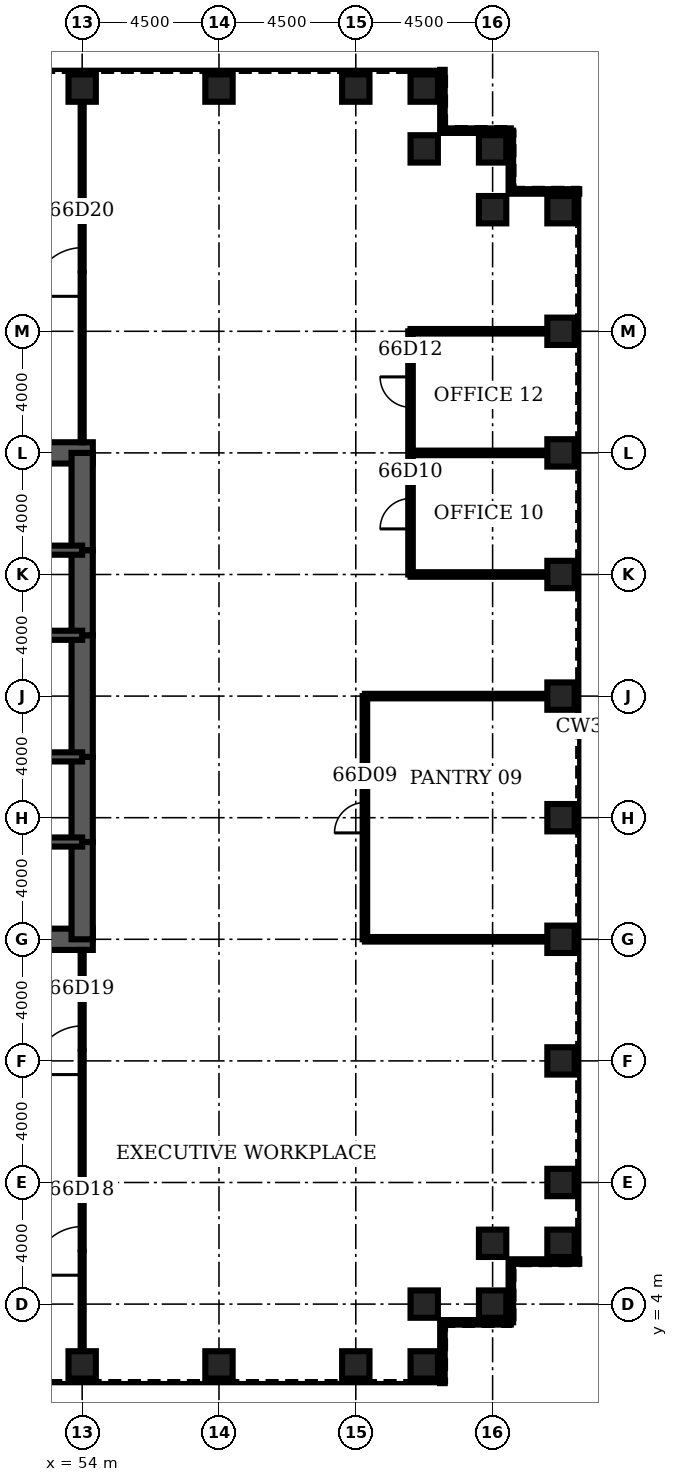
"""IFC4 building model, lengths in metres.
Left out: names, types, materials, properties, quantities, classifications, styles, units other than length and angle.
Written with IfcOpenShell. Run it as: python <this file> out.ifc"""

import sys

from ifc_helpers import new_model, si_unit, direction, frame, frame_2d, origin, origin_2d, place, context, subcontext, project, spatial, rectangle, hollow_rectangle, extrude, element, fill, save


model = new_model("IFC4")
c1 = context("Model", 3, precision=1e-05, world=origin(), true_north=direction((0.0, 1.0)))
c2 = subcontext(c1, "Body", "Model", "MODEL_VIEW")
j1 = project(units=[si_unit("LENGTHUNIT", "METRE"), si_unit("PLANEANGLEUNIT", "RADIAN")], contexts=[c1])
p1 = place(None, origin())
s1 = spatial("IfcSite", under=j1, at=p1, CompositionType="ELEMENT")
p2 = place(p1, origin())
s2 = spatial("IfcBuilding", under=s1, at=p2, CompositionType="ELEMENT")
p3 = place(p2, frame((0.0, 0.0, 292.1)))
s3 = spatial("IfcBuildingStorey", under=s2, at=p3, CompositionType="ELEMENT", Elevation=292.1)
for number, where, z_axis, x_axis in (
    (1, (54.0, 2.0, 0.0), (0.0, 0.0, 1.0), (0.0, 1.0, 0.0)),
    (2, (58.5, 2.0, 0.0), (0.0, 0.0, 1.0), (0.0, 1.0, 0.0)),
    (3, (63.0, 2.0, 0.0), (0.0, 0.0, 1.0), (0.0, 1.0, 0.0)),
    (4, (65.25, 2.0, 0.0), (0.0, 0.0, 1.0), (0.0, 1.0, 0.0)),
    (5, (65.25, 4.0, 0.0), (0.0, 0.0, 1.0), (0.0, 1.0, 0.0)),
    (6, (67.5, 4.0, 0.0), (0.0, 0.0, 1.0), (1.0, 0.0, 0.0)),
    (7, (67.5, 6.0, 0.0), (0.0, 0.0, 1.0), (1.0, 0.0, 0.0)),
    (8, (69.75, 6.0, 0.0), (0.0, 0.0, 1.0), (1.0, 0.0, 0.0)),
    (9, (69.75, 8.0, 0.0), (0.0, 0.0, 1.0), (1.0, 0.0, 0.0)),
    (10, (69.75, 12.0, 0.0), (0.0, 0.0, 1.0), (1.0, 0.0, 0.0)),
    (11, (69.75, 16.0, 0.0), (0.0, 0.0, 1.0), (1.0, 0.0, 0.0)),
    (12, (69.75, 20.0, 0.0), (0.0, 0.0, 1.0), (1.0, 0.0, 0.0)),
    (13, (69.75, 24.0, 0.0), (0.0, 0.0, 1.0), (1.0, 0.0, 0.0)),
    (14, (69.75, 28.0, 0.0), (0.0, 0.0, 1.0), (1.0, 0.0, 0.0)),
    (15, (69.75, 32.0, 0.0), (0.0, 0.0, 1.0), (1.0, 0.0, 0.0)),
    (16, (69.75, 36.0, 0.0), (0.0, 0.0, 1.0), (1.0, 0.0, 0.0)),
    (17, (69.75, 40.0, 0.0), (0.0, 0.0, 1.0), (1.0, 0.0, 0.0)),
    (18, (67.5, 40.0, 0.0), (0.0, 0.0, 1.0), (1.0, 0.0, 0.0)),
    (19, (67.5, 42.0, 0.0), (0.0, 0.0, 1.0), (1.0, 0.0, 0.0)),
    (20, (65.25, 42.0, 0.0), (0.0, 0.0, 1.0), (0.0, 1.0, 0.0)),
    (21, (65.25, 44.0, 0.0), (0.0, 0.0, 1.0), (0.0, 1.0, 0.0)),
    (22, (63.0, 44.0, 0.0), (0.0, 0.0, 1.0), (0.0, 1.0, 0.0)),
    (23, (58.5, 44.0, 0.0), (0.0, 0.0, 1.0), (0.0, 1.0, 0.0)),
    (24, (54.0, 44.0, 0.0), (0.0, 0.0, 1.0), (0.0, 1.0, 0.0)),
):
    element("IfcColumn", number, at=place(p3, frame(where, z_axis=z_axis, x_axis=x_axis)), inside=s3, PredefinedType="COLUMN", context=c2, shape_type="SweptSolid", body=[
        extrude(hollow_rectangle(XDim=0.9, YDim=0.9, WallThickness=0.06, at=origin_2d()), origin(), (0.0, 0.0, 1.0), 4.2),
    ])
for number, where, z_axis, x_axis in (
    (25, (45.0, 16.0, 0.0), (0.0, 0.0, 1.0), (1.0, 0.0, 0.0)),
    (26, (54.35, 32.0, 0.0), (0.0, 0.0, 1.0), (-1.0, 0.0, 0.0)),
):
    element("IfcWall", number, at=place(p3, frame(where, z_axis=z_axis, x_axis=x_axis)), inside=s3, PredefinedType="SHEAR", context=c2, shape_type="SweptSolid", body=[
        extrude(rectangle(XDim=9.35, YDim=0.7, at=frame_2d((4.675, 0.0))), origin(), (0.0, 0.0, 1.0), 4.2),
    ])
p4 = place(p3, frame((54.0, 16.0, 0.0), z_axis=(0.0, 0.0, 1.0), x_axis=(0.0, 1.0, 0.0)))
e27 = element("IfcWall", 27, at=p4, inside=s3, PredefinedType="SHEAR", context=c2, shape_type="SweptSolid", body=[
    extrude(rectangle(XDim=3.2, YDim=0.7, at=frame_2d((1.6, 0.0))), origin(), (0.0, 0.0, 1.0), 4.2),
])
p5 = place(p3, frame((54.0, 19.2, 0.0), z_axis=(0.0, 0.0, 1.0), x_axis=(0.0, 1.0, 0.0)))
e28 = element("IfcWall", 28, at=p5, inside=s3, PredefinedType="SHEAR", context=c2, shape_type="SweptSolid", body=[
    extrude(rectangle(XDim=2.8, YDim=0.7, at=frame_2d((1.4, 0.0))), origin(), (0.0, 0.0, 1.0), 4.2),
])
p6 = place(p5, frame((0.4, 0.0, 0.0)))
e29 = element("IfcOpeningElement", 29, at=p6, cuts=e28, PredefinedType="OPENING", context=c2, shape_type="SweptSolid", body=[
    extrude(rectangle(XDim=1.8, YDim=2.1, at=frame_2d((0.9, 1.05))), frame((0.0, 0.36, 0.0), z_axis=(0.0, -1.0, 0.0), x_axis=(1.0, 0.0, 0.0)), (0.0, 0.0, 1.0), 0.72),
])
p7 = place(p3, frame((54.0, 22.0, 0.0), z_axis=(0.0, 0.0, 1.0), x_axis=(0.0, 1.0, 0.0)))
e30 = element("IfcWall", 30, at=p7, inside=s3, PredefinedType="SHEAR", context=c2, shape_type="SweptSolid", body=[
    extrude(rectangle(XDim=4.0, YDim=0.7, at=frame_2d((2.0, 0.0))), origin(), (0.0, 0.0, 1.0), 4.2),
])
p8 = place(p3, frame((54.0, 26.0, 0.0), z_axis=(0.0, 0.0, 1.0), x_axis=(0.0, 1.0, 0.0)))
e31 = element("IfcWall", 31, at=p8, inside=s3, PredefinedType="SHEAR", context=c2, shape_type="SweptSolid", body=[
    extrude(rectangle(XDim=2.8, YDim=0.7, at=frame_2d((1.4, 0.0))), origin(), (0.0, 0.0, 1.0), 4.2),
])
p9 = place(p8, frame((0.6, 0.0, 0.0)))
e32 = element("IfcOpeningElement", 32, at=p9, cuts=e31, PredefinedType="OPENING", context=c2, shape_type="SweptSolid", body=[
    extrude(rectangle(XDim=1.8, YDim=2.1, at=frame_2d((0.9, 1.05))), frame((0.0, 0.36, 0.0), z_axis=(0.0, -1.0, 0.0), x_axis=(1.0, 0.0, 0.0)), (0.0, 0.0, 1.0), 0.72),
])
p10 = place(p3, frame((54.0, 28.8, 0.0), z_axis=(0.0, 0.0, 1.0), x_axis=(0.0, 1.0, 0.0)))
e33 = element("IfcWall", 33, at=p10, inside=s3, PredefinedType="SHEAR", context=c2, shape_type="SweptSolid", body=[
    extrude(rectangle(XDim=3.2, YDim=0.7, at=frame_2d((1.6, 0.0))), origin(), (0.0, 0.0, 1.0), 4.2),
])
p11 = place(p3, frame((45.0, 19.2, 0.0), z_axis=(0.0, 0.0, 1.0), x_axis=(1.0, 0.0, 0.0)))
e34 = element("IfcWall", 34, at=p11, inside=s3, PredefinedType="SOLIDWALL", context=c2, shape_type="SweptSolid", body=[
    extrude(rectangle(XDim=9.0, YDim=0.3, at=frame_2d((4.5, 0.0))), origin(), (0.0, 0.0, 1.0), 4.2),
])
p12 = place(p11, frame((7.35, 0.0, 0.0)))
e35 = element("IfcOpeningElement", 35, at=p12, cuts=e34, PredefinedType="OPENING", context=c2, shape_type="SweptSolid", body=[
    extrude(rectangle(XDim=1.0, YDim=2.1, at=frame_2d((0.5, 1.05))), frame((0.0, 0.16, 0.0), z_axis=(0.0, -1.0, 0.0), x_axis=(1.0, 0.0, 0.0)), (0.0, 0.0, 1.0), 0.32),
])
p13 = place(p3, frame((45.0, 28.8, 0.0), z_axis=(0.0, 0.0, 1.0), x_axis=(1.0, 0.0, 0.0)))
e36 = element("IfcWall", 36, at=p13, inside=s3, PredefinedType="SOLIDWALL", context=c2, shape_type="SweptSolid", body=[
    extrude(rectangle(XDim=9.0, YDim=0.3, at=frame_2d((4.5, 0.0))), origin(), (0.0, 0.0, 1.0), 4.2),
])
p14 = place(p13, frame((7.35, 0.0, 0.0)))
e37 = element("IfcOpeningElement", 37, at=p14, cuts=e36, PredefinedType="OPENING", context=c2, shape_type="SweptSolid", body=[
    extrude(rectangle(XDim=1.0, YDim=2.1, at=frame_2d((0.5, 1.05))), frame((0.0, 0.16, 0.0), z_axis=(0.0, -1.0, 0.0), x_axis=(1.0, 0.0, 0.0)), (0.0, 0.0, 1.0), 0.32),
])
p15 = place(p3, frame((48.0, 22.0, 0.0), z_axis=(0.0, 0.0, 1.0), x_axis=(1.0, 0.0, 0.0)))
e38 = element("IfcWall", 38, at=p15, inside=s3, PredefinedType="SOLIDWALL", context=c2, shape_type="SweptSolid", body=[
    extrude(rectangle(XDim=6.0, YDim=0.3, at=frame_2d((3.0, 0.0))), origin(), (0.0, 0.0, 1.0), 4.2),
])
p16 = place(p15, frame((2.0, 0.0, 0.0)))
e39 = element("IfcOpeningElement", 39, at=p16, cuts=e38, PredefinedType="OPENING", context=c2, shape_type="SweptSolid", body=[
    extrude(rectangle(XDim=1.0, YDim=2.1, at=frame_2d((0.5, 1.05))), frame((0.0, 0.16, 0.0), z_axis=(0.0, -1.0, 0.0), x_axis=(1.0, 0.0, 0.0)), (0.0, 0.0, 1.0), 0.32),
])
p17 = place(p15, frame((4.25, 0.0, 0.0)))
e40 = element("IfcOpeningElement", 40, at=p17, cuts=e38, PredefinedType="OPENING", context=c2, shape_type="SweptSolid", body=[
    extrude(rectangle(XDim=1.0, YDim=2.1, at=frame_2d((0.5, 1.05))), frame((0.0, 0.16, 0.0), z_axis=(0.0, -1.0, 0.0), x_axis=(1.0, 0.0, 0.0)), (0.0, 0.0, 1.0), 0.32),
])
p18 = place(p3, frame((48.0, 26.0, 0.0), z_axis=(0.0, 0.0, 1.0), x_axis=(1.0, 0.0, 0.0)))
e41 = element("IfcWall", 41, at=p18, inside=s3, PredefinedType="SOLIDWALL", context=c2, shape_type="SweptSolid", body=[
    extrude(rectangle(XDim=6.0, YDim=0.3, at=frame_2d((3.0, 0.0))), origin(), (0.0, 0.0, 1.0), 4.2),
])
for number, where, z_axis, x_axis in (
    (42, (63.3, 16.0, 0.0), (0.0, 0.0, 1.0), (1.0, 0.0, 0.0)),
    (43, (63.3, 24.0, 0.0), (0.0, 0.0, 1.0), (1.0, 0.0, 0.0)),
):
    element("IfcWall", number, at=place(p3, frame(where, z_axis=z_axis, x_axis=x_axis)), inside=s3, PredefinedType="PARTITIONING", context=c2, shape_type="SweptSolid", body=[
        extrude(rectangle(XDim=6.0, YDim=0.15, at=frame_2d((3.0, 0.0))), origin(), (0.0, 0.0, 1.0), 3.0),
    ])
for number, where, z_axis, x_axis in (
    (44, (64.8, 28.0, 0.0), (0.0, 0.0, 1.0), (1.0, 0.0, 0.0)),
    (45, (64.8, 32.0, 0.0), (0.0, 0.0, 1.0), (1.0, 0.0, 0.0)),
    (46, (64.8, 36.0, 0.0), (0.0, 0.0, 1.0), (1.0, 0.0, 0.0)),
):
    element("IfcWall", number, at=place(p3, frame(where, z_axis=z_axis, x_axis=x_axis)), inside=s3, PredefinedType="PARTITIONING", context=c2, shape_type="SweptSolid", body=[
        extrude(rectangle(XDim=4.5, YDim=0.15, at=frame_2d((2.25, 0.0))), origin(), (0.0, 0.0, 1.0), 3.0),
    ])
p19 = place(p3, frame((54.0, 2.45, 0.0), z_axis=(0.0, 0.0, 1.0), x_axis=(0.0, 1.0, 0.0)))
e47 = element("IfcWall", 47, at=p19, inside=s3, PredefinedType="PARTITIONING", context=c2, shape_type="SweptSolid", body=[
    extrude(rectangle(XDim=13.2, YDim=0.1, at=frame_2d((6.6, 0.0))), origin(), (0.0, 0.0, 1.0), 3.0),
])
p20 = place(p19, frame((2.5, 0.0, 0.0)))
e48 = element("IfcOpeningElement", 48, at=p20, cuts=e47, PredefinedType="OPENING", context=c2, shape_type="SweptSolid", body=[
    extrude(rectangle(XDim=1.6, YDim=2.1, at=frame_2d((0.8, 1.05))), frame((0.0, 0.06, 0.0), z_axis=(0.0, -1.0, 0.0), x_axis=(1.0, 0.0, 0.0)), (0.0, 0.0, 1.0), 0.12),
])
p21 = place(p19, frame((9.1, 0.0, 0.0)))
e49 = element("IfcOpeningElement", 49, at=p21, cuts=e47, PredefinedType="OPENING", context=c2, shape_type="SweptSolid", body=[
    extrude(rectangle(XDim=1.6, YDim=2.1, at=frame_2d((0.8, 1.05))), frame((0.0, 0.06, 0.0), z_axis=(0.0, -1.0, 0.0), x_axis=(1.0, 0.0, 0.0)), (0.0, 0.0, 1.0), 0.12),
])
p22 = place(p3, frame((54.0, 32.35, 0.0), z_axis=(0.0, 0.0, 1.0), x_axis=(0.0, 1.0, 0.0)))
e50 = element("IfcWall", 50, at=p22, inside=s3, PredefinedType="PARTITIONING", context=c2, shape_type="SweptSolid", body=[
    extrude(rectangle(XDim=11.2, YDim=0.1, at=frame_2d((5.6, 0.0))), origin(), (0.0, 0.0, 1.0), 3.0),
])
p23 = place(p22, frame((4.8, 0.0, 0.0)))
e51 = element("IfcOpeningElement", 51, at=p23, cuts=e50, PredefinedType="OPENING", context=c2, shape_type="SweptSolid", body=[
    extrude(rectangle(XDim=1.6, YDim=2.1, at=frame_2d((0.8, 1.05))), frame((0.0, 0.06, 0.0), z_axis=(0.0, -1.0, 0.0), x_axis=(1.0, 0.0, 0.0)), (0.0, 0.0, 1.0), 0.12),
])
p24 = place(p3, frame((63.3, 16.0, 0.0), z_axis=(0.0, 0.0, 1.0), x_axis=(0.0, 1.0, 0.0)))
e52 = element("IfcWall", 52, at=p24, inside=s3, PredefinedType="PARTITIONING", context=c2, shape_type="SweptSolid", body=[
    extrude(rectangle(XDim=8.0, YDim=0.15, at=frame_2d((4.0, 0.0))), origin(), (0.0, 0.0, 1.0), 3.0),
])
p25 = place(p24, frame((3.5, 0.0, 0.0)))
e53 = element("IfcOpeningElement", 53, at=p25, cuts=e52, PredefinedType="OPENING", context=c2, shape_type="SweptSolid", body=[
    extrude(rectangle(XDim=1.0, YDim=2.1, at=frame_2d((0.5, 1.05))), frame((0.0, 0.085, 0.0), z_axis=(0.0, -1.0, 0.0), x_axis=(1.0, 0.0, 0.0)), (0.0, 0.0, 1.0), 0.17),
])
p26 = place(p3, frame((64.8, 28.0, 0.0), z_axis=(0.0, 0.0, 1.0), x_axis=(0.0, 1.0, 0.0)))
e54 = element("IfcWall", 54, at=p26, inside=s3, PredefinedType="PARTITIONING", context=c2, shape_type="SweptSolid", body=[
    extrude(rectangle(XDim=8.0, YDim=0.15, at=frame_2d((4.0, 0.0))), origin(), (0.0, 0.0, 1.0), 3.0),
])
p27 = place(p26, frame((1.5, 0.0, 0.0)))
e55 = element("IfcOpeningElement", 55, at=p27, cuts=e54, PredefinedType="OPENING", context=c2, shape_type="SweptSolid", body=[
    extrude(rectangle(XDim=1.0, YDim=2.1, at=frame_2d((0.5, 1.05))), frame((0.0, 0.085, 0.0), z_axis=(0.0, -1.0, 0.0), x_axis=(1.0, 0.0, 0.0)), (0.0, 0.0, 1.0), 0.17),
])
p28 = place(p26, frame((5.5, 0.0, 0.0)))
e56 = element("IfcOpeningElement", 56, at=p28, cuts=e54, PredefinedType="OPENING", context=c2, shape_type="SweptSolid", body=[
    extrude(rectangle(XDim=1.0, YDim=2.1, at=frame_2d((0.5, 1.05))), frame((0.0, 0.085, 0.0), z_axis=(0.0, -1.0, 0.0), x_axis=(1.0, 0.0, 0.0)), (0.0, 0.0, 1.0), 0.17),
])
p29 = place(p3, frame((65.85, 1.4, 0.0), z_axis=(0.0, 0.0, 1.0), x_axis=(0.0, 1.0, 0.0)))
e57 = element("IfcWall", 57, at=p29, inside=s3, PredefinedType="ELEMENTEDWALL", context=c2, shape_type="SweptSolid", body=[
    extrude(rectangle(XDim=2.0, YDim=0.15, at=frame_2d((1.0, 0.0))), origin(), (0.0, 0.0, 1.0), 4.04),
])
p30 = place(p3, frame((65.85, 3.4, 0.0), z_axis=(0.0, 0.0, 1.0), x_axis=(1.0, 0.0, 0.0)))
e58 = element("IfcWall", 58, at=p30, inside=s3, PredefinedType="ELEMENTEDWALL", context=c2, shape_type="SweptSolid", body=[
    extrude(rectangle(XDim=2.25, YDim=0.15, at=frame_2d((1.125, 0.0))), origin(), (0.0, 0.0, 1.0), 4.04),
])
p31 = place(p3, frame((68.1, 3.4, 0.0), z_axis=(0.0, 0.0, 1.0), x_axis=(0.0, 1.0, 0.0)))
e59 = element("IfcWall", 59, at=p31, inside=s3, PredefinedType="ELEMENTEDWALL", context=c2, shape_type="SweptSolid", body=[
    extrude(rectangle(XDim=2.0, YDim=0.15, at=frame_2d((1.0, 0.0))), origin(), (0.0, 0.0, 1.0), 4.04),
])
for number, where, z_axis, x_axis in (
    (60, (68.1, 5.4, 0.0), (0.0, 0.0, 1.0), (1.0, 0.0, 0.0)),
    (61, (70.35, 40.6, 0.0), (0.0, 0.0, 1.0), (-1.0, 0.0, 0.0)),
):
    element("IfcWall", number, at=place(p3, frame(where, z_axis=z_axis, x_axis=x_axis)), inside=s3, PredefinedType="ELEMENTEDWALL", context=c2, shape_type="SweptSolid", body=[
        extrude(rectangle(XDim=2.25, YDim=0.15, at=frame_2d((1.125, 0.0))), origin(), (0.0, 0.0, 1.0), 4.04),
    ])
p32 = place(p3, frame((68.1, 40.6, 0.0), z_axis=(0.0, 0.0, 1.0), x_axis=(0.0, 1.0, 0.0)))
e62 = element("IfcWall", 62, at=p32, inside=s3, PredefinedType="ELEMENTEDWALL", context=c2, shape_type="SweptSolid", body=[
    extrude(rectangle(XDim=2.0, YDim=0.15, at=frame_2d((1.0, 0.0))), origin(), (0.0, 0.0, 1.0), 4.04),
])
p33 = place(p3, frame((68.1, 42.6, 0.0), z_axis=(0.0, 0.0, 1.0), x_axis=(-1.0, 0.0, 0.0)))
e63 = element("IfcWall", 63, at=p33, inside=s3, PredefinedType="ELEMENTEDWALL", context=c2, shape_type="SweptSolid", body=[
    extrude(rectangle(XDim=2.25, YDim=0.15, at=frame_2d((1.125, 0.0))), origin(), (0.0, 0.0, 1.0), 4.04),
])
p34 = place(p3, frame((65.85, 42.6, 0.0), z_axis=(0.0, 0.0, 1.0), x_axis=(0.0, 1.0, 0.0)))
e64 = element("IfcWall", 64, at=p34, inside=s3, PredefinedType="ELEMENTEDWALL", context=c2, shape_type="SweptSolid", body=[
    extrude(rectangle(XDim=2.0, YDim=0.15, at=frame_2d((1.0, 0.0))), origin(), (0.0, 0.0, 1.0), 4.04),
])
p35 = place(p25, origin())
e65 = element("IfcDoor", 65, at=p35, inside=s3, OperationType="SINGLE_SWING_LEFT", PredefinedType="DOOR", context=c2, shape_type="SweptSolid", body=[
    extrude(rectangle(XDim=1.0, YDim=2.1, at=frame_2d((0.5, 1.05))), frame((0.0, 0.025, 0.0), z_axis=(0.0, -1.0, 0.0), x_axis=(1.0, 0.0, 0.0)), (0.0, 0.0, 1.0), 0.05),
])
fill(e53, e65)
p36 = place(p27, origin())
e66 = element("IfcDoor", 66, at=p36, inside=s3, OperationType="SINGLE_SWING_LEFT", PredefinedType="DOOR", context=c2, shape_type="SweptSolid", body=[
    extrude(rectangle(XDim=1.0, YDim=2.1, at=frame_2d((0.5, 1.05))), frame((0.0, 0.025, 0.0), z_axis=(0.0, -1.0, 0.0), x_axis=(1.0, 0.0, 0.0)), (0.0, 0.0, 1.0), 0.05),
])
fill(e55, e66)
p37 = place(p28, origin())
e67 = element("IfcDoor", 67, at=p37, inside=s3, OperationType="SINGLE_SWING_RIGHT", PredefinedType="DOOR", context=c2, shape_type="SweptSolid", body=[
    extrude(rectangle(XDim=1.0, YDim=2.1, at=frame_2d((0.5, 1.05))), frame((0.0, 0.025, 0.0), z_axis=(0.0, -1.0, 0.0), x_axis=(1.0, 0.0, 0.0)), (0.0, 0.0, 1.0), 0.05),
])
fill(e56, e67)
p38 = place(p20, origin())
e68 = element("IfcDoor", 68, at=p38, inside=s3, OperationType="SINGLE_SWING_LEFT", PredefinedType="DOOR", context=c2, shape_type="SweptSolid", body=[
    extrude(rectangle(XDim=1.6, YDim=2.1, at=frame_2d((0.8, 1.05))), frame((0.0, 0.025, 0.0), z_axis=(0.0, -1.0, 0.0), x_axis=(1.0, 0.0, 0.0)), (0.0, 0.0, 1.0), 0.05),
])
fill(e48, e68)
p39 = place(p21, origin())
e69 = element("IfcDoor", 69, at=p39, inside=s3, OperationType="SINGLE_SWING_LEFT", PredefinedType="DOOR", context=c2, shape_type="SweptSolid", body=[
    extrude(rectangle(XDim=1.6, YDim=2.1, at=frame_2d((0.8, 1.05))), frame((0.0, 0.025, 0.0), z_axis=(0.0, -1.0, 0.0), x_axis=(1.0, 0.0, 0.0)), (0.0, 0.0, 1.0), 0.05),
])
fill(e49, e69)
p40 = place(p23, origin())
e70 = element("IfcDoor", 70, at=p40, inside=s3, OperationType="SINGLE_SWING_LEFT", PredefinedType="DOOR", context=c2, shape_type="SweptSolid", body=[
    extrude(rectangle(XDim=1.6, YDim=2.1, at=frame_2d((0.8, 1.05))), frame((0.0, 0.025, 0.0), z_axis=(0.0, -1.0, 0.0), x_axis=(1.0, 0.0, 0.0)), (0.0, 0.0, 1.0), 0.05),
])
fill(e51, e70)
p41 = place(p12, origin())
e71 = element("IfcDoor", 71, at=p41, inside=s3, OperationType="SINGLE_SWING_RIGHT", PredefinedType="DOOR", context=c2, shape_type="SweptSolid", body=[
    extrude(rectangle(XDim=1.0, YDim=2.1, at=frame_2d((0.5, 1.05))), frame((0.0, 0.025, 0.0), z_axis=(0.0, -1.0, 0.0), x_axis=(1.0, 0.0, 0.0)), (0.0, 0.0, 1.0), 0.05),
])
fill(e35, e71)
p42 = place(p14, origin())
e72 = element("IfcDoor", 72, at=p42, inside=s3, OperationType="SINGLE_SWING_RIGHT", PredefinedType="DOOR", context=c2, shape_type="SweptSolid", body=[
    extrude(rectangle(XDim=1.0, YDim=2.1, at=frame_2d((0.5, 1.05))), frame((0.0, 0.025, 0.0), z_axis=(0.0, -1.0, 0.0), x_axis=(1.0, 0.0, 0.0)), (0.0, 0.0, 1.0), 0.05),
])
fill(e37, e72)
p43 = place(p6, origin())
e73 = element("IfcDoor", 73, at=p43, inside=s3, OperationType="SINGLE_SWING_LEFT", PredefinedType="DOOR", context=c2, shape_type="SweptSolid", body=[
    extrude(rectangle(XDim=1.8, YDim=2.1, at=frame_2d((0.9, 1.05))), frame((0.0, 0.35, 0.0), z_axis=(0.0, -1.0, 0.0), x_axis=(1.0, 0.0, 0.0)), (0.0, 0.0, 1.0), 0.699),
])
fill(e29, e73)
p44 = place(p9, origin())
e74 = element("IfcDoor", 74, at=p44, inside=s3, OperationType="SINGLE_SWING_LEFT", PredefinedType="DOOR", context=c2, shape_type="SweptSolid", body=[
    extrude(rectangle(XDim=1.8, YDim=2.1, at=frame_2d((0.9, 1.05))), frame((0.0, 0.35, 0.0), z_axis=(0.0, -1.0, 0.0), x_axis=(1.0, 0.0, 0.0)), (0.0, 0.0, 1.0), 0.699),
])
fill(e32, e74)
p45 = place(p17, origin())
e75 = element("IfcDoor", 75, at=p45, inside=s3, OperationType="SINGLE_SWING_RIGHT", PredefinedType="DOOR", context=c2, shape_type="SweptSolid", body=[
    extrude(rectangle(XDim=1.0, YDim=2.1, at=frame_2d((0.5, 1.05))), frame((0.0, 0.025, 0.0), z_axis=(0.0, -1.0, 0.0), x_axis=(1.0, 0.0, 0.0)), (0.0, 0.0, 1.0), 0.05),
])
fill(e40, e75)
save(model, sys.argv[1])
